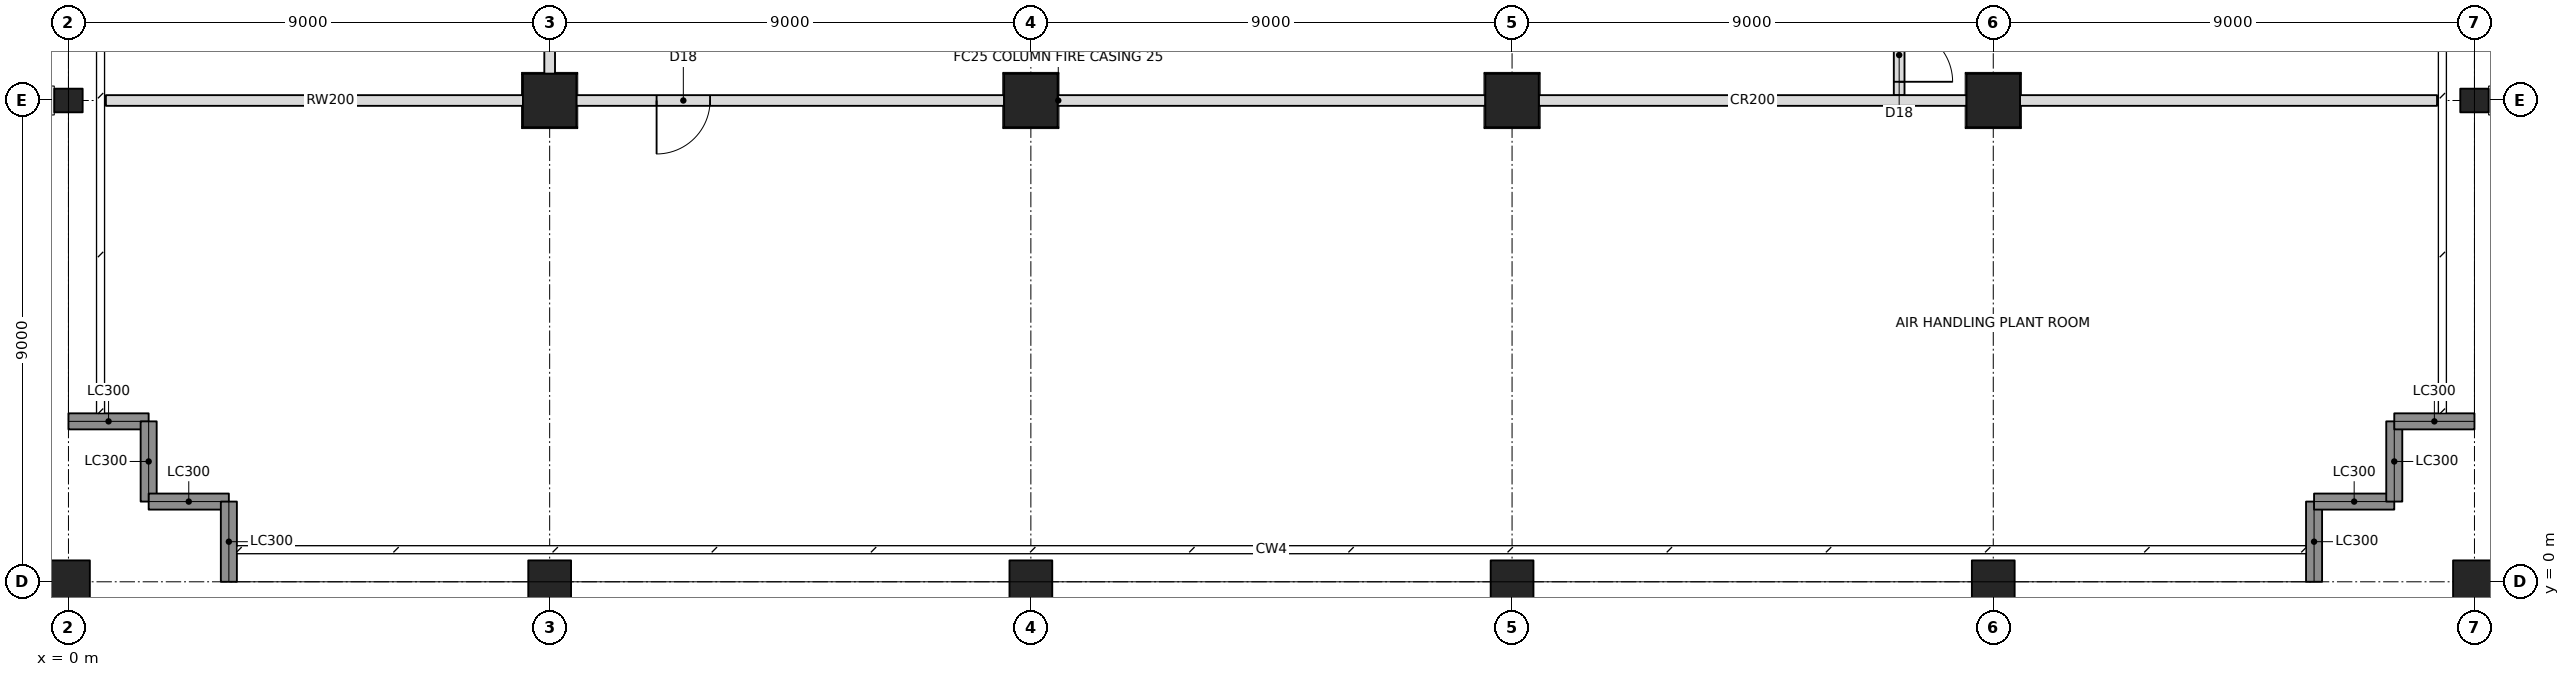
"""IFC4 building model, lengths in metres.
Left out: names, types, materials, properties, quantities, classifications, styles, units other than length and angle.
Written with IfcOpenShell. Run it as: python <this file> out.ifc"""

import sys

from ifc_helpers import new_model, si_unit, direction, frame, frame_2d, origin, origin_with_axes, origin_2d, place, context, subcontext, project, spatial, rectangle, hollow_rectangle, i_section, extrude, element, fill, save


model = new_model("IFC4")
c1 = context("Model", 3, precision=1e-05, world=origin(), true_north=direction((0.0, 1.0)))
c2 = subcontext(c1, "Body", "Model", "MODEL_VIEW")
j1 = project(units=[si_unit("LENGTHUNIT", "METRE"), si_unit("PLANEANGLEUNIT", "RADIAN")], contexts=[c1])
p1 = place(None, origin())
s1 = spatial("IfcSite", under=j1, at=p1, CompositionType="ELEMENT")
p2 = place(p1, origin())
s2 = spatial("IfcBuilding", under=s1, at=p2, CompositionType="ELEMENT")
p3 = place(p2, frame((0.0, 0.0, 155.4)))
s3 = spatial("IfcBuildingStorey", under=s2, at=p3, CompositionType="ELEMENT", Elevation=155.4)
p4 = place(p3, origin_with_axes())
e1 = element("IfcColumn", 1, at=p4, inside=s3, PredefinedType="COLUMN", context=c2, shape_type="SweptSolid", body=[
    extrude(hollow_rectangle(XDim=0.8, YDim=0.8, WallThickness=0.06, at=origin_2d()), origin(), (0.0, 0.0, 1.0), 5.0),
])
p5 = place(p3, frame((0.0, 9.0, 0.0), z_axis=(0.0, 0.0, 1.0), x_axis=(0.0, 1.0, 0.0)))
e2 = element("IfcColumn", 2, at=p5, inside=s3, PredefinedType="COLUMN", context=c2, shape_type="SweptSolid", body=[
    extrude(i_section(OverallWidth=0.442, OverallDepth=0.531, WebThickness=0.066, FlangeThickness=0.106, at=origin_2d()), origin(), (0.0, 0.0, 1.0), 5.0),
])
p6 = place(p3, frame((9.0, 0.0, 0.0), z_axis=(0.0, 0.0, 1.0), x_axis=(1.0, 0.0, 0.0)))
e3 = element("IfcColumn", 3, at=p6, inside=s3, PredefinedType="COLUMN", context=c2, shape_type="SweptSolid", body=[
    extrude(hollow_rectangle(XDim=0.8, YDim=0.8, WallThickness=0.06, at=origin_2d()), origin(), (0.0, 0.0, 1.0), 5.0),
])
p7 = place(p3, frame((9.0, 9.0, 0.0), z_axis=(0.0, 0.0, 1.0), x_axis=(1.0, 0.0, 0.0)))
e4 = element("IfcColumn", 4, at=p7, inside=s3, PredefinedType="COLUMN", context=c2, shape_type="SweptSolid", body=[
    extrude(hollow_rectangle(XDim=1.0, YDim=1.0, WallThickness=0.1, at=origin_2d()), origin(), (0.0, 0.0, 1.0), 5.0),
])
p8 = place(p3, frame((18.0, 0.0, 0.0), z_axis=(0.0, 0.0, 1.0), x_axis=(1.0, 0.0, 0.0)))
e5 = element("IfcColumn", 5, at=p8, inside=s3, PredefinedType="COLUMN", context=c2, shape_type="SweptSolid", body=[
    extrude(hollow_rectangle(XDim=0.8, YDim=0.8, WallThickness=0.06, at=origin_2d()), origin(), (0.0, 0.0, 1.0), 5.0),
])
p9 = place(p3, frame((18.0, 9.0, 0.0), z_axis=(0.0, 0.0, 1.0), x_axis=(1.0, 0.0, 0.0)))
e6 = element("IfcColumn", 6, at=p9, inside=s3, PredefinedType="COLUMN", context=c2, shape_type="SweptSolid", body=[
    extrude(hollow_rectangle(XDim=1.0, YDim=1.0, WallThickness=0.1, at=origin_2d()), origin(), (0.0, 0.0, 1.0), 5.0),
])
p10 = place(p3, frame((27.0, 0.0, 0.0), z_axis=(0.0, 0.0, 1.0), x_axis=(1.0, 0.0, 0.0)))
e7 = element("IfcColumn", 7, at=p10, inside=s3, PredefinedType="COLUMN", context=c2, shape_type="SweptSolid", body=[
    extrude(hollow_rectangle(XDim=0.8, YDim=0.8, WallThickness=0.06, at=origin_2d()), origin(), (0.0, 0.0, 1.0), 5.0),
])
p11 = place(p3, frame((27.0, 9.0, 0.0), z_axis=(0.0, 0.0, 1.0), x_axis=(1.0, 0.0, 0.0)))
e8 = element("IfcColumn", 8, at=p11, inside=s3, PredefinedType="COLUMN", context=c2, shape_type="SweptSolid", body=[
    extrude(hollow_rectangle(XDim=1.0, YDim=1.0, WallThickness=0.1, at=origin_2d()), origin(), (0.0, 0.0, 1.0), 5.0),
])
p12 = place(p3, frame((36.0, 0.0, 0.0), z_axis=(0.0, 0.0, 1.0), x_axis=(1.0, 0.0, 0.0)))
e9 = element("IfcColumn", 9, at=p12, inside=s3, PredefinedType="COLUMN", context=c2, shape_type="SweptSolid", body=[
    extrude(hollow_rectangle(XDim=0.8, YDim=0.8, WallThickness=0.06, at=origin_2d()), origin(), (0.0, 0.0, 1.0), 5.0),
])
p13 = place(p3, frame((36.0, 9.0, 0.0), z_axis=(0.0, 0.0, 1.0), x_axis=(0.0, 1.0, 0.0)))
e10 = element("IfcColumn", 10, at=p13, inside=s3, PredefinedType="COLUMN", context=c2, shape_type="SweptSolid", body=[
    extrude(hollow_rectangle(XDim=1.0, YDim=1.0, WallThickness=0.1, at=origin_2d()), origin(), (0.0, 0.0, 1.0), 5.0),
])
p14 = place(p3, frame((45.0, 0.0, 0.0), z_axis=(0.0, 0.0, 1.0), x_axis=(1.0, 0.0, 0.0)))
e11 = element("IfcColumn", 11, at=p14, inside=s3, PredefinedType="COLUMN", context=c2, shape_type="SweptSolid", body=[
    extrude(hollow_rectangle(XDim=0.8, YDim=0.8, WallThickness=0.06, at=origin_2d()), origin(), (0.0, 0.0, 1.0), 5.0),
])
p15 = place(p3, frame((45.0, 9.0, 0.0), z_axis=(0.0, 0.0, 1.0), x_axis=(0.0, 1.0, 0.0)))
e12 = element("IfcColumn", 12, at=p15, inside=s3, PredefinedType="COLUMN", context=c2, shape_type="SweptSolid", body=[
    extrude(i_section(OverallWidth=0.442, OverallDepth=0.531, WebThickness=0.066, FlangeThickness=0.106, at=origin_2d()), origin(), (0.0, 0.0, 1.0), 5.0),
])
p16 = place(p3, frame((42.0, 0.0, 0.0), z_axis=(0.0, 0.0, 1.0), x_axis=(0.0, 1.0, 0.0)))
e13 = element("IfcWall", 13, at=p16, inside=s3, PredefinedType="SOLIDWALL", context=c2, shape_type="SweptSolid", body=[
    extrude(rectangle(XDim=1.5, YDim=0.3, at=frame_2d((0.75, 0.0))), origin(), (0.0, 0.0, 1.0), 3.852),
])
for number, where, z_axis, x_axis in (
    (14, (42.0, 1.5, 0.0), (0.0, 0.0, 1.0), (1.0, 0.0, 0.0)),
    (15, (43.5, 1.5, 0.0), (0.0, 0.0, 1.0), (0.0, 1.0, 0.0)),
):
    element("IfcWall", number, at=place(p3, frame(where, z_axis=z_axis, x_axis=x_axis)), inside=s3, PredefinedType="SOLIDWALL", context=c2, shape_type="SweptSolid", body=[
        extrude(rectangle(XDim=1.5, YDim=0.3, at=frame_2d((0.75, 0.0))), origin(), (0.0, 0.0, 1.0), 4.8),
    ])
for number, where, z_axis, x_axis in (
    (16, (43.5, 3.0, 0.0), (0.0, 0.0, 1.0), (1.0, 0.0, 0.0)),
    (17, (0.0, 3.0, 0.0), (0.0, 0.0, 1.0), (1.0, 0.0, 0.0)),
):
    element("IfcWall", number, at=place(p3, frame(where, z_axis=z_axis, x_axis=x_axis)), inside=s3, PredefinedType="SOLIDWALL", context=c2, shape_type="SweptSolid", body=[
        extrude(rectangle(XDim=1.5, YDim=0.3, at=frame_2d((0.75, 0.0))), origin(), (0.0, 0.0, 1.0), 3.852),
    ])
for number, where, z_axis, x_axis in (
    (18, (1.5, 3.0, 0.0), (0.0, 0.0, 1.0), (0.0, -1.0, 0.0)),
    (19, (1.5, 1.5, 0.0), (0.0, 0.0, 1.0), (1.0, 0.0, 0.0)),
):
    element("IfcWall", number, at=place(p3, frame(where, z_axis=z_axis, x_axis=x_axis)), inside=s3, PredefinedType="SOLIDWALL", context=c2, shape_type="SweptSolid", body=[
        extrude(rectangle(XDim=1.5, YDim=0.3, at=frame_2d((0.75, 0.0))), origin(), (0.0, 0.0, 1.0), 4.8),
    ])
p17 = place(p3, frame((3.0, 1.5, 0.0), z_axis=(0.0, 0.0, 1.0), x_axis=(0.0, -1.0, 0.0)))
e20 = element("IfcWall", 20, at=p17, inside=s3, PredefinedType="SOLIDWALL", context=c2, shape_type="SweptSolid", body=[
    extrude(rectangle(XDim=1.5, YDim=0.3, at=frame_2d((0.75, 0.0))), origin(), (0.0, 0.0, 1.0), 3.852),
])
p18 = place(p3, frame((9.0, 9.5, 0.0), z_axis=(0.0, 0.0, 1.0), x_axis=(0.0, 1.0, 0.0)))
e21 = element("IfcWall", 21, at=p18, inside=s3, PredefinedType="PARTITIONING", context=c2, shape_type="SweptSolid", body=[
    extrude(rectangle(XDim=8.0, YDim=0.2, at=frame_2d((4.0, 0.0))), origin(), (0.0, 0.0, 1.0), 4.005),
])
p19 = place(p18, frame((2.5, 0.0, 0.0)))
e22 = element("IfcOpeningElement", 22, at=p19, cuts=e21, PredefinedType="OPENING", context=c2, shape_type="SweptSolid", body=[
    extrude(rectangle(XDim=1.0, YDim=2.1, at=frame_2d((0.5, 1.05))), frame((0.0, 0.11, 0.0), z_axis=(0.0, -1.0, 0.0), x_axis=(1.0, 0.0, 0.0)), (0.0, 0.0, 1.0), 0.22),
])
p20 = place(p3, frame((0.7, 9.0, 0.0), z_axis=(0.0, 0.0, 1.0), x_axis=(1.0, 0.0, 0.0)))
e23 = element("IfcWall", 23, at=p20, inside=s3, PredefinedType="PARTITIONING", context=c2, shape_type="SweptSolid", body=[
    extrude(rectangle(XDim=8.4, YDim=0.2, at=frame_2d((4.2, 0.0))), origin(), (0.0, 0.0, 1.0), 4.005),
])
p21 = place(p3, frame((9.5, 9.0, 0.0), z_axis=(0.0, 0.0, 1.0), x_axis=(1.0, 0.0, 0.0)))
e24 = element("IfcWall", 24, at=p21, inside=s3, PredefinedType="PARTITIONING", context=c2, shape_type="SweptSolid", body=[
    extrude(rectangle(XDim=8.0, YDim=0.2, at=frame_2d((4.0, 0.0))), origin(), (0.0, 0.0, 1.0), 4.005),
])
p22 = place(p21, frame((1.5, 0.0, 0.0)))
e25 = element("IfcOpeningElement", 25, at=p22, cuts=e24, PredefinedType="OPENING", context=c2, shape_type="SweptSolid", body=[
    extrude(rectangle(XDim=1.0, YDim=2.1, at=frame_2d((0.5, 1.05))), frame((0.0, 0.11, 0.0), z_axis=(0.0, -1.0, 0.0), x_axis=(1.0, 0.0, 0.0)), (0.0, 0.0, 1.0), 0.22),
])
for number, where, z_axis, x_axis in (
    (26, (18.5, 9.0, 0.0), (0.0, 0.0, 1.0), (1.0, 0.0, 0.0)),
    (27, (27.5, 9.0, 0.0), (0.0, 0.0, 1.0), (1.0, 0.0, 0.0)),
):
    element("IfcWall", number, at=place(p3, frame(where, z_axis=z_axis, x_axis=x_axis)), inside=s3, PredefinedType="PARTITIONING", context=c2, shape_type="SweptSolid", body=[
        extrude(rectangle(XDim=8.0, YDim=0.2, at=frame_2d((4.0, 0.0))), origin(), (0.0, 0.0, 1.0), 4.005),
    ])
p23 = place(p3, frame((36.5, 9.0, 0.0), z_axis=(0.0, 0.0, 1.0), x_axis=(1.0, 0.0, 0.0)))
e28 = element("IfcWall", 28, at=p23, inside=s3, PredefinedType="PARTITIONING", context=c2, shape_type="SweptSolid", body=[
    extrude(rectangle(XDim=7.8, YDim=0.2, at=frame_2d((3.9, 0.0))), origin(), (0.0, 0.0, 1.0), 4.038),
])
p24 = place(p3, frame((34.24, 9.1, 0.0), z_axis=(0.0, 0.0, 1.0), x_axis=(0.0, 1.0, 0.0)))
e29 = element("IfcWall", 29, at=p24, inside=s3, PredefinedType="PARTITIONING", context=c2, shape_type="SweptSolid", body=[
    extrude(rectangle(XDim=1.7, YDim=0.2, at=frame_2d((0.85, 0.0))), origin(), (0.0, 0.0, 1.0), 4.004),
])
p25 = place(p24, frame((0.25, 0.0, 0.0)))
e30 = element("IfcOpeningElement", 30, at=p25, cuts=e29, PredefinedType="OPENING", context=c2, shape_type="SweptSolid", body=[
    extrude(rectangle(XDim=1.0, YDim=2.1, at=frame_2d((0.5, 1.05))), frame((0.0, 0.11, 0.0), z_axis=(0.0, -1.0, 0.0), x_axis=(1.0, 0.0, 0.0)), (0.0, 0.0, 1.0), 0.22),
])
p26 = place(p22, frame((1.0, 0.0, 0.0), z_axis=(0.0, 0.0, 1.0), x_axis=(-1.0, 0.0, 0.0)))
e31 = element("IfcDoor", 31, at=p26, inside=s3, OperationType="SINGLE_SWING_RIGHT", PredefinedType="DOOR", context=c2, shape_type="SweptSolid", body=[
    extrude(rectangle(XDim=1.0, YDim=2.1, at=frame_2d((0.5, 1.05))), frame((0.0, 0.025, 0.0), z_axis=(0.0, -1.0, 0.0), x_axis=(1.0, 0.0, 0.0)), (0.0, 0.0, 1.0), 0.05),
])
fill(e25, e31)
p27 = place(p25, frame((1.0, 0.0, 0.0), z_axis=(0.0, 0.0, 1.0), x_axis=(-1.0, 0.0, 0.0)))
e32 = element("IfcDoor", 32, at=p27, inside=s3, OperationType="SINGLE_SWING_RIGHT", PredefinedType="DOOR", context=c2, shape_type="SweptSolid", body=[
    extrude(rectangle(XDim=1.0, YDim=2.1, at=frame_2d((0.5, 1.05))), frame((0.0, 0.025, 0.0), z_axis=(0.0, -1.0, 0.0), x_axis=(1.0, 0.0, 0.0)), (0.0, 0.0, 1.0), 0.05),
])
fill(e30, e32)
save(model, sys.argv[1])
